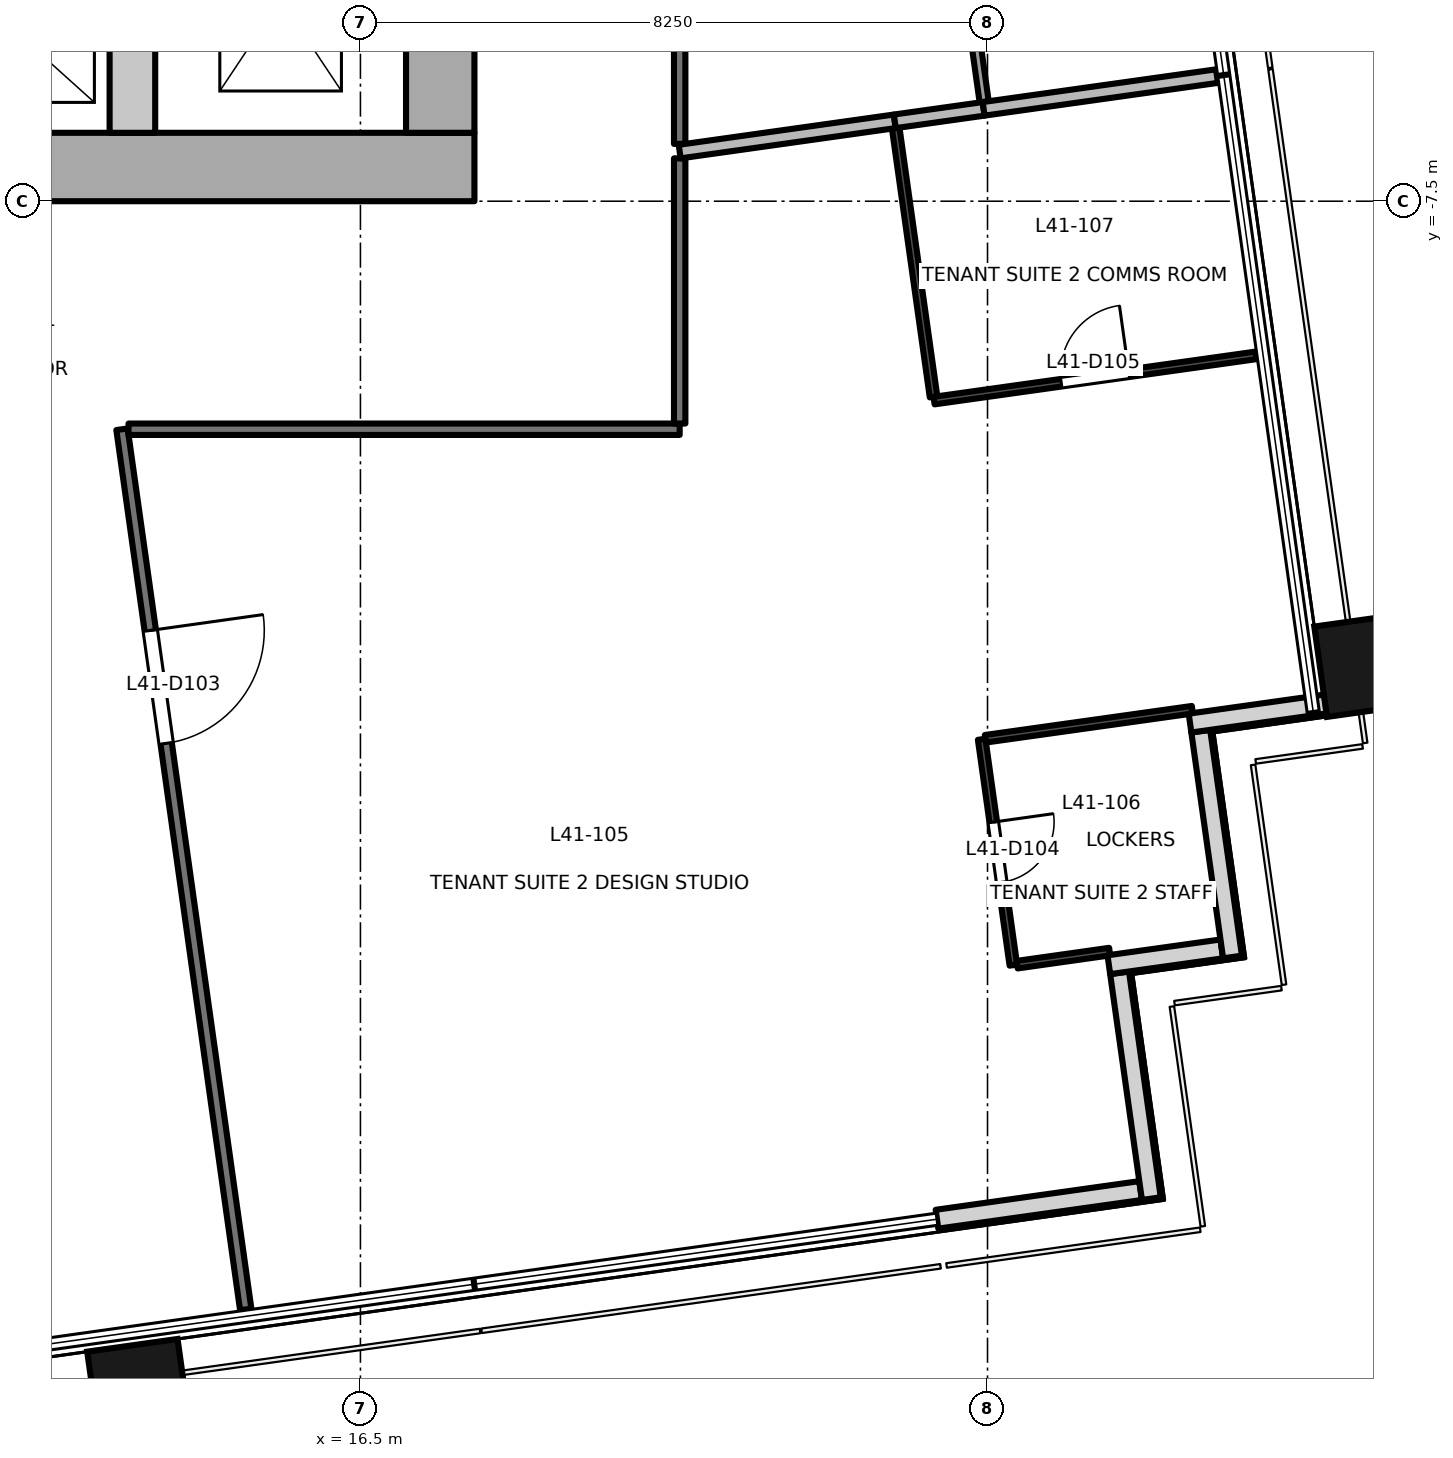
"""IFC4 building model, lengths in metres.
Left out: names, types, materials, properties, quantities, classifications, styles, units other than length and angle.
Written with IfcOpenShell. Run it as: python <this file> out.ifc"""

import sys

from ifc_helpers import new_model, si_unit, direction, frame, frame_2d, origin, origin_2d, place, context, subcontext, project, spatial, rectangle, extrude, element, fill, save


model = new_model("IFC4")
c1 = context("Model", 3, precision=1e-05, world=origin(), true_north=direction((0.0, 1.0)))
c2 = subcontext(c1, "Body", "Model", "MODEL_VIEW")
j1 = project(units=[si_unit("LENGTHUNIT", "METRE"), si_unit("PLANEANGLEUNIT", "RADIAN")], contexts=[c1])
p1 = place(None, origin())
s1 = spatial("IfcSite", under=j1, at=p1, CompositionType="ELEMENT")
p2 = place(p1, origin())
s2 = spatial("IfcBuilding", under=s1, at=p2, CompositionType="ELEMENT")
p3 = place(p2, frame((0.0, 0.0, 180.2)))
s3 = spatial("IfcBuildingStorey", under=s2, at=p3, CompositionType="ELEMENT", Elevation=180.2)
for number, where, z_axis, x_axis in (
    (1, (13.625, -23.443, -0.2), (0.0, 0.0, 1.0), (0.99, 0.139, 0.0)),
    (2, (30.024, -13.565, -0.2), (0.0, 0.0, 1.0), (-0.139, 0.99, 0.0)),
):
    element("IfcColumn", number, at=place(p3, frame(where, z_axis=z_axis, x_axis=x_axis)), inside=s3, PredefinedType="COLUMN", context=c2, shape_type="SweptSolid", body=[
        extrude(rectangle(XDim=1.2, YDim=1.8, at=origin_2d()), origin(), (0.0, 0.0, 1.0), 3.9),
    ])
p4 = place(p3, frame((24.085, -20.893, 0.0), z_axis=(0.0, 0.0, 1.0), x_axis=(0.990255800966, 0.139260362823, 0.0)))
e3 = element("IfcWall", 3, at=p4, inside=s3, PredefinedType="SOLIDWALL", context=c2, shape_type="SweptSolid", body=[
    extrude(rectangle(XDim=2.705, YDim=0.25, at=frame_2d((1.353, 0.0))), origin(), (0.0, 0.0, 1.0), 3.7),
])
p5 = place(p3, frame((26.905, -20.622, 0.0), z_axis=(0.0, 0.0, 1.0), x_axis=(-0.139313431826, 0.990248336385, 0.0)))
e4 = element("IfcWall", 4, at=p5, inside=s3, PredefinedType="SOLIDWALL", context=c2, shape_type="SweptSolid", body=[
    extrude(rectangle(XDim=3.0, YDim=0.25, at=frame_2d((1.5, 0.0))), origin(), (0.0, 0.0, 1.0), 3.7),
])
p6 = place(p3, frame((26.346, -17.544, 0.0), z_axis=(0.0, 0.0, 1.0), x_axis=(0.990368090482, 0.13845954411, 0.0)))
e5 = element("IfcWall", 5, at=p6, inside=s3, PredefinedType="SOLIDWALL", context=c2, shape_type="SweptSolid", body=[
    extrude(rectangle(XDim=1.5, YDim=0.25, at=frame_2d((0.75, 0.0))), origin(), (0.0, 0.0, 1.0), 3.7),
])
p7 = place(p3, frame((27.973, -17.443, 0.0), z_axis=(0.0, 0.0, 1.0), x_axis=(-0.139313431826, 0.990248336385, 0.0)))
e6 = element("IfcWall", 6, at=p7, inside=s3, PredefinedType="SOLIDWALL", context=c2, shape_type="SweptSolid", body=[
    extrude(rectangle(XDim=3.0, YDim=0.25, at=frame_2d((1.5, 0.0))), origin(), (0.0, 0.0, 1.0), 3.7),
])
p8 = place(p3, frame((27.414, -14.366, 0.0), z_axis=(0.0, 0.0, 1.0), x_axis=(0.990256286673, 0.139256908998, 0.0)))
e7 = element("IfcWall", 7, at=p8, inside=s3, PredefinedType="SOLIDWALL", context=c2, shape_type="SweptSolid", body=[
    extrude(rectangle(XDim=1.801, YDim=0.25, at=frame_2d((0.9, 0.0))), origin(), (0.0, 0.0, 1.0), 3.7),
])
p9 = place(p3, frame((-18.0, -7.05, -0.2), z_axis=(0.0, 0.0, 1.0), x_axis=(1.0, 0.0, 0.0)))
e8 = element("IfcWall", 8, at=p9, inside=s3, PredefinedType="SHEAR", context=c2, shape_type="SweptSolid", body=[
    extrude(rectangle(XDim=36.0, YDim=0.9, at=frame_2d((18.0, 0.0))), origin(), (0.0, 0.0, 1.0), 3.9),
])
p10 = place(p9, frame((11.3, 0.0, 0.2)))
e9 = element("IfcOpeningElement", 9, at=p10, cuts=e8, PredefinedType="OPENING", context=c2, shape_type="SweptSolid", body=[
    extrude(rectangle(XDim=1.8, YDim=2.1, at=frame_2d((0.9, 1.05))), frame((0.0, 0.46, 0.0), z_axis=(0.0, -1.0, 0.0), x_axis=(1.0, 0.0, 0.0)), (0.0, 0.0, 1.0), 0.921),
])
p11 = place(p9, frame((16.8, 0.0, 0.2)))
e10 = element("IfcOpeningElement", 10, at=p11, cuts=e8, PredefinedType="OPENING", context=c2, shape_type="SweptSolid", body=[
    extrude(rectangle(XDim=2.4, YDim=2.1, at=frame_2d((1.2, 1.05))), frame((0.0, 0.46, 0.0), z_axis=(0.0, -1.0, 0.0), x_axis=(1.0, 0.0, 0.0)), (0.0, 0.0, 1.0), 0.921),
])
p12 = place(p9, frame((26.1, 0.0, 0.2)))
e11 = element("IfcOpeningElement", 11, at=p12, cuts=e8, PredefinedType="OPENING", context=c2, shape_type="SweptSolid", body=[
    extrude(rectangle(XDim=2.4, YDim=2.1, at=frame_2d((1.2, 1.05))), frame((0.0, 0.46, 0.0), z_axis=(0.0, -1.0, 0.0), x_axis=(1.0, 0.0, 0.0)), (0.0, 0.0, 1.0), 0.921),
])
p13 = place(p3, frame((17.55, -6.6, -0.2), z_axis=(0.0, 0.0, 1.0), x_axis=(0.0, 1.0, 0.0)))
e12 = element("IfcWall", 12, at=p13, inside=s3, PredefinedType="SHEAR", context=c2, shape_type="SweptSolid", body=[
    extrude(rectangle(XDim=13.2, YDim=0.9, at=frame_2d((6.6, 0.0))), origin(), (0.0, 0.0, 1.0), 3.9),
])
p14 = place(p13, frame((4.55, 0.0, 0.2)))
e13 = element("IfcOpeningElement", 13, at=p14, cuts=e12, PredefinedType="OPENING", context=c2, shape_type="SweptSolid", body=[
    extrude(rectangle(XDim=1.2, YDim=2.1, at=frame_2d((0.6, 1.05))), frame((0.0, 0.46, 0.0), z_axis=(0.0, -1.0, 0.0), x_axis=(1.0, 0.0, 0.0)), (0.0, 0.0, 1.0), 0.921),
])
p15 = place(p3, frame((13.5, -6.6, -0.2), z_axis=(0.0, 0.0, 1.0), x_axis=(0.0, 1.0, 0.0)))
e14 = element("IfcWall", 14, at=p15, inside=s3, PredefinedType="SHEAR", context=c2, shape_type="SweptSolid", body=[
    extrude(rectangle(XDim=13.2, YDim=0.6, at=frame_2d((6.6, 0.0))), origin(), (0.0, 0.0, 1.0), 3.9),
])
p16 = place(p3, frame((13.363, -10.5, 0.0), z_axis=(0.0, 0.0, 1.0), x_axis=(0.139211326844, -0.990262695692, 0.0)))
e15 = element("IfcWall", 15, at=p16, inside=s3, PredefinedType="PARTITIONING", context=c2, shape_type="SweptSolid", body=[
    extrude(rectangle(XDim=11.694, YDim=0.15, at=frame_2d((5.847, 0.0))), origin(), (0.0, 0.0, 1.0), 3.1),
])
p17 = place(p16, frame((2.673, 0.0, 0.0)))
e16 = element("IfcOpeningElement", 16, at=p17, cuts=e15, PredefinedType="OPENING", context=c2, shape_type="SweptSolid", body=[
    extrude(rectangle(XDim=1.5, YDim=2.1, at=frame_2d((0.75, 1.05))), frame((0.0, 0.085, 0.0), z_axis=(0.0, -1.0, 0.0), x_axis=(1.0, 0.0, 0.0)), (0.0, 0.0, 1.0), 0.171),
])
p18 = place(p3, frame((20.7, -10.5, 0.0), z_axis=(0.0, 0.0, 1.0), x_axis=(-1.0, 0.0, 0.0)))
e17 = element("IfcWall", 17, at=p18, inside=s3, PredefinedType="PARTITIONING", context=c2, shape_type="SweptSolid", body=[
    extrude(rectangle(XDim=7.251, YDim=0.15, at=frame_2d((3.625, 0.0))), origin(), (0.0, 0.0, 1.0), 3.1),
])
p19 = place(p3, frame((20.7, -6.936, 0.0), z_axis=(0.0, 0.0, 1.0), x_axis=(0.0, -1.0, 0.0)))
e18 = element("IfcWall", 18, at=p19, inside=s3, PredefinedType="PARTITIONING", context=c2, shape_type="SweptSolid", body=[
    extrude(rectangle(XDim=3.489, YDim=0.15, at=frame_2d((1.745, 0.0))), origin(), (0.0, 0.0, 1.0), 3.7),
])
p20 = place(p3, frame((20.7, 4.576, 0.0), z_axis=(0.0, 0.0, 1.0), x_axis=(0.0, -1.0, 0.0)))
e19 = element("IfcWall", 19, at=p20, inside=s3, PredefinedType="PARTITIONING", context=c2, shape_type="SweptSolid", body=[
    extrude(rectangle(XDim=11.322, YDim=0.15, at=frame_2d((5.661, 0.0))), origin(), (0.0, 0.0, 1.0), 3.25),
])
p21 = place(p20, frame((7.691, 0.0, 0.0)))
e20 = element("IfcOpeningElement", 20, at=p21, cuts=e19, PredefinedType="OPENING", context=c2, shape_type="SweptSolid", body=[
    extrude(rectangle(XDim=0.9, YDim=2.1, at=frame_2d((0.45, 1.05))), frame((0.0, 0.085, 0.0), z_axis=(0.0, -1.0, 0.0), x_axis=(1.0, 0.0, 0.0)), (0.0, 0.0, 1.0), 0.171),
])
p22 = place(p3, frame((24.673, -14.579, 0.0), z_axis=(0.0, 0.0, 1.0), x_axis=(0.138994228812, -0.990293191109, 0.0)))
e21 = element("IfcWall", 21, at=p22, inside=s3, PredefinedType="PARTITIONING", context=c2, shape_type="SweptSolid", body=[
    extrude(rectangle(XDim=3.0, YDim=0.1, at=frame_2d((1.5, 0.0))), origin(), (0.0, 0.0, 1.0), 3.7),
])
p23 = place(p22, frame((1.1, 0.0, 0.0)))
e22 = element("IfcOpeningElement", 22, at=p23, cuts=e21, PredefinedType="OPENING", context=c2, shape_type="SweptSolid", body=[
    extrude(rectangle(XDim=0.8, YDim=2.1, at=frame_2d((0.4, 1.05))), frame((0.0, 0.061, 0.0), z_axis=(0.0, -1.0, 0.0), x_axis=(1.0, 0.0, 0.0)), (0.0, 0.0, 1.0), 0.121),
])
p24 = place(p3, frame((25.14, -17.544, 0.0), z_axis=(0.0, 0.0, 1.0), x_axis=(0.990174663817, 0.139836100968, 0.0)))
e23 = element("IfcWall", 23, at=p24, inside=s3, PredefinedType="PARTITIONING", context=c2, shape_type="SweptSolid", body=[
    extrude(rectangle(XDim=1.229, YDim=0.1, at=frame_2d((0.615, 0.0))), origin(), (0.0, 0.0, 1.0), 3.7),
])
p25 = place(p3, frame((27.445, -14.19, 0.0), z_axis=(0.0, 0.0, 1.0), x_axis=(-0.990299764824, -0.138947384969, 0.0)))
e24 = element("IfcWall", 24, at=p25, inside=s3, PredefinedType="PARTITIONING", context=c2, shape_type="SweptSolid", body=[
    extrude(rectangle(XDim=2.75, YDim=0.1, at=frame_2d((1.375, 0.0))), origin(), (0.0, 0.0, 1.0), 3.7),
])
p26 = place(p3, frame((23.542, -6.538, 0.0), z_axis=(0.0, 0.0, 1.0), x_axis=(0.139477964322, -0.990225175134, 0.0)))
e25 = element("IfcWall", 25, at=p26, inside=s3, PredefinedType="PARTITIONING", context=c2, shape_type="SweptSolid", body=[
    extrude(rectangle(XDim=3.571, YDim=0.1, at=frame_2d((1.785, 0.0))), origin(), (0.0, 0.0, 1.0), 3.7),
])
p27 = place(p3, frame((24.047, -10.123, 0.0), z_axis=(0.0, 0.0, 1.0), x_axis=(0.990283364174, 0.139064224876, 0.0)))
e26 = element("IfcWall", 26, at=p27, inside=s3, PredefinedType="PARTITIONING", context=c2, shape_type="SweptSolid", body=[
    extrude(rectangle(XDim=4.278, YDim=0.1, at=frame_2d((2.139, 0.0))), origin(), (0.0, 0.0, 1.0), 3.7),
])
p28 = place(p27, frame((1.689, 0.0, 0.0)))
e27 = element("IfcOpeningElement", 27, at=p28, cuts=e26, PredefinedType="OPENING", context=c2, shape_type="SweptSolid", body=[
    extrude(rectangle(XDim=0.9, YDim=2.1, at=frame_2d((0.45, 1.05))), frame((0.0, 0.061, 0.0), z_axis=(0.0, -1.0, 0.0), x_axis=(1.0, 0.0, 0.0)), (0.0, 0.0, 1.0), 0.121),
])
p29 = place(p3, frame((20.7, -6.847, 0.0), z_axis=(0.0, 0.0, 1.0), x_axis=(0.990258051292, 0.139244360214, 0.0)))
e28 = element("IfcWall", 28, at=p29, inside=s3, PredefinedType="PARTITIONING", context=c2, shape_type="SweptSolid", body=[
    extrude(rectangle(XDim=2.858, YDim=0.18, at=frame_2d((1.429, 0.0))), origin(), (0.0, 0.0, 1.0), 3.7),
])
p30 = place(p3, frame((23.53, -6.449, 0.0), z_axis=(0.0, 0.0, 1.0), x_axis=(0.990293977152, 0.138988628372, 0.0)))
e29 = element("IfcWall", 29, at=p30, inside=s3, PredefinedType="PARTITIONING", context=c2, shape_type="SweptSolid", body=[
    extrude(rectangle(XDim=1.18, YDim=0.18, at=frame_2d((0.59, 0.0))), origin(), (0.0, 0.0, 1.0), 3.7),
])
p31 = place(p3, frame((24.699, -6.285, 0.0), z_axis=(0.0, 0.0, 1.0), x_axis=(0.990293026317, 0.138995402899, 0.0)))
e30 = element("IfcWall", 30, at=p31, inside=s3, PredefinedType="PARTITIONING", context=c2, shape_type="SweptSolid", body=[
    extrude(rectangle(XDim=3.1, YDim=0.18, at=frame_2d((1.55, 0.0))), origin(), (0.0, 0.0, 1.0), 3.7),
])
p32 = place(p3, frame((24.309, -3.371, 0.0), z_axis=(0.0, 0.0, 1.0), x_axis=(0.139298147854, -0.990250486495, 0.0)))
e31 = element("IfcWall", 31, at=p32, inside=s3, PredefinedType="PARTITIONING", context=c2, shape_type="SweptSolid", body=[
    extrude(rectangle(XDim=2.85, YDim=0.12, at=frame_2d((1.425, 0.0))), origin(), (0.0, 0.0, 1.0), 3.25),
])
p33 = place(p17, origin())
e32 = element("IfcDoor", 32, at=p33, inside=s3, OperationType="DOUBLE_DOOR_SINGLE_SWING", PredefinedType="DOOR", context=c2, shape_type="SweptSolid", body=[
    extrude(rectangle(XDim=1.5, YDim=2.1, at=frame_2d((0.75, 1.05))), frame((0.0, 0.025, 0.0), z_axis=(0.0, -1.0, 0.0), x_axis=(1.0, 0.0, 0.0)), (0.0, 0.0, 1.0), 0.05),
])
fill(e16, e32)
p34 = place(p23, origin())
e33 = element("IfcDoor", 33, at=p34, inside=s3, OperationType="SINGLE_SWING_LEFT", PredefinedType="DOOR", context=c2, shape_type="SweptSolid", body=[
    extrude(rectangle(XDim=0.8, YDim=2.1, at=frame_2d((0.4, 1.05))), frame((0.0, 0.025, 0.0), z_axis=(0.0, -1.0, 0.0), x_axis=(1.0, 0.0, 0.0)), (0.0, 0.0, 1.0), 0.05),
])
fill(e22, e33)
p35 = place(p28, origin())
e34 = element("IfcDoor", 34, at=p35, inside=s3, OperationType="SINGLE_SWING_RIGHT", PredefinedType="DOOR", context=c2, shape_type="SweptSolid", body=[
    extrude(rectangle(XDim=0.9, YDim=2.1, at=frame_2d((0.45, 1.05))), frame((0.0, 0.025, 0.0), z_axis=(0.0, -1.0, 0.0), x_axis=(1.0, 0.0, 0.0)), (0.0, 0.0, 1.0), 0.05),
])
fill(e27, e34)
save(model, sys.argv[1])
